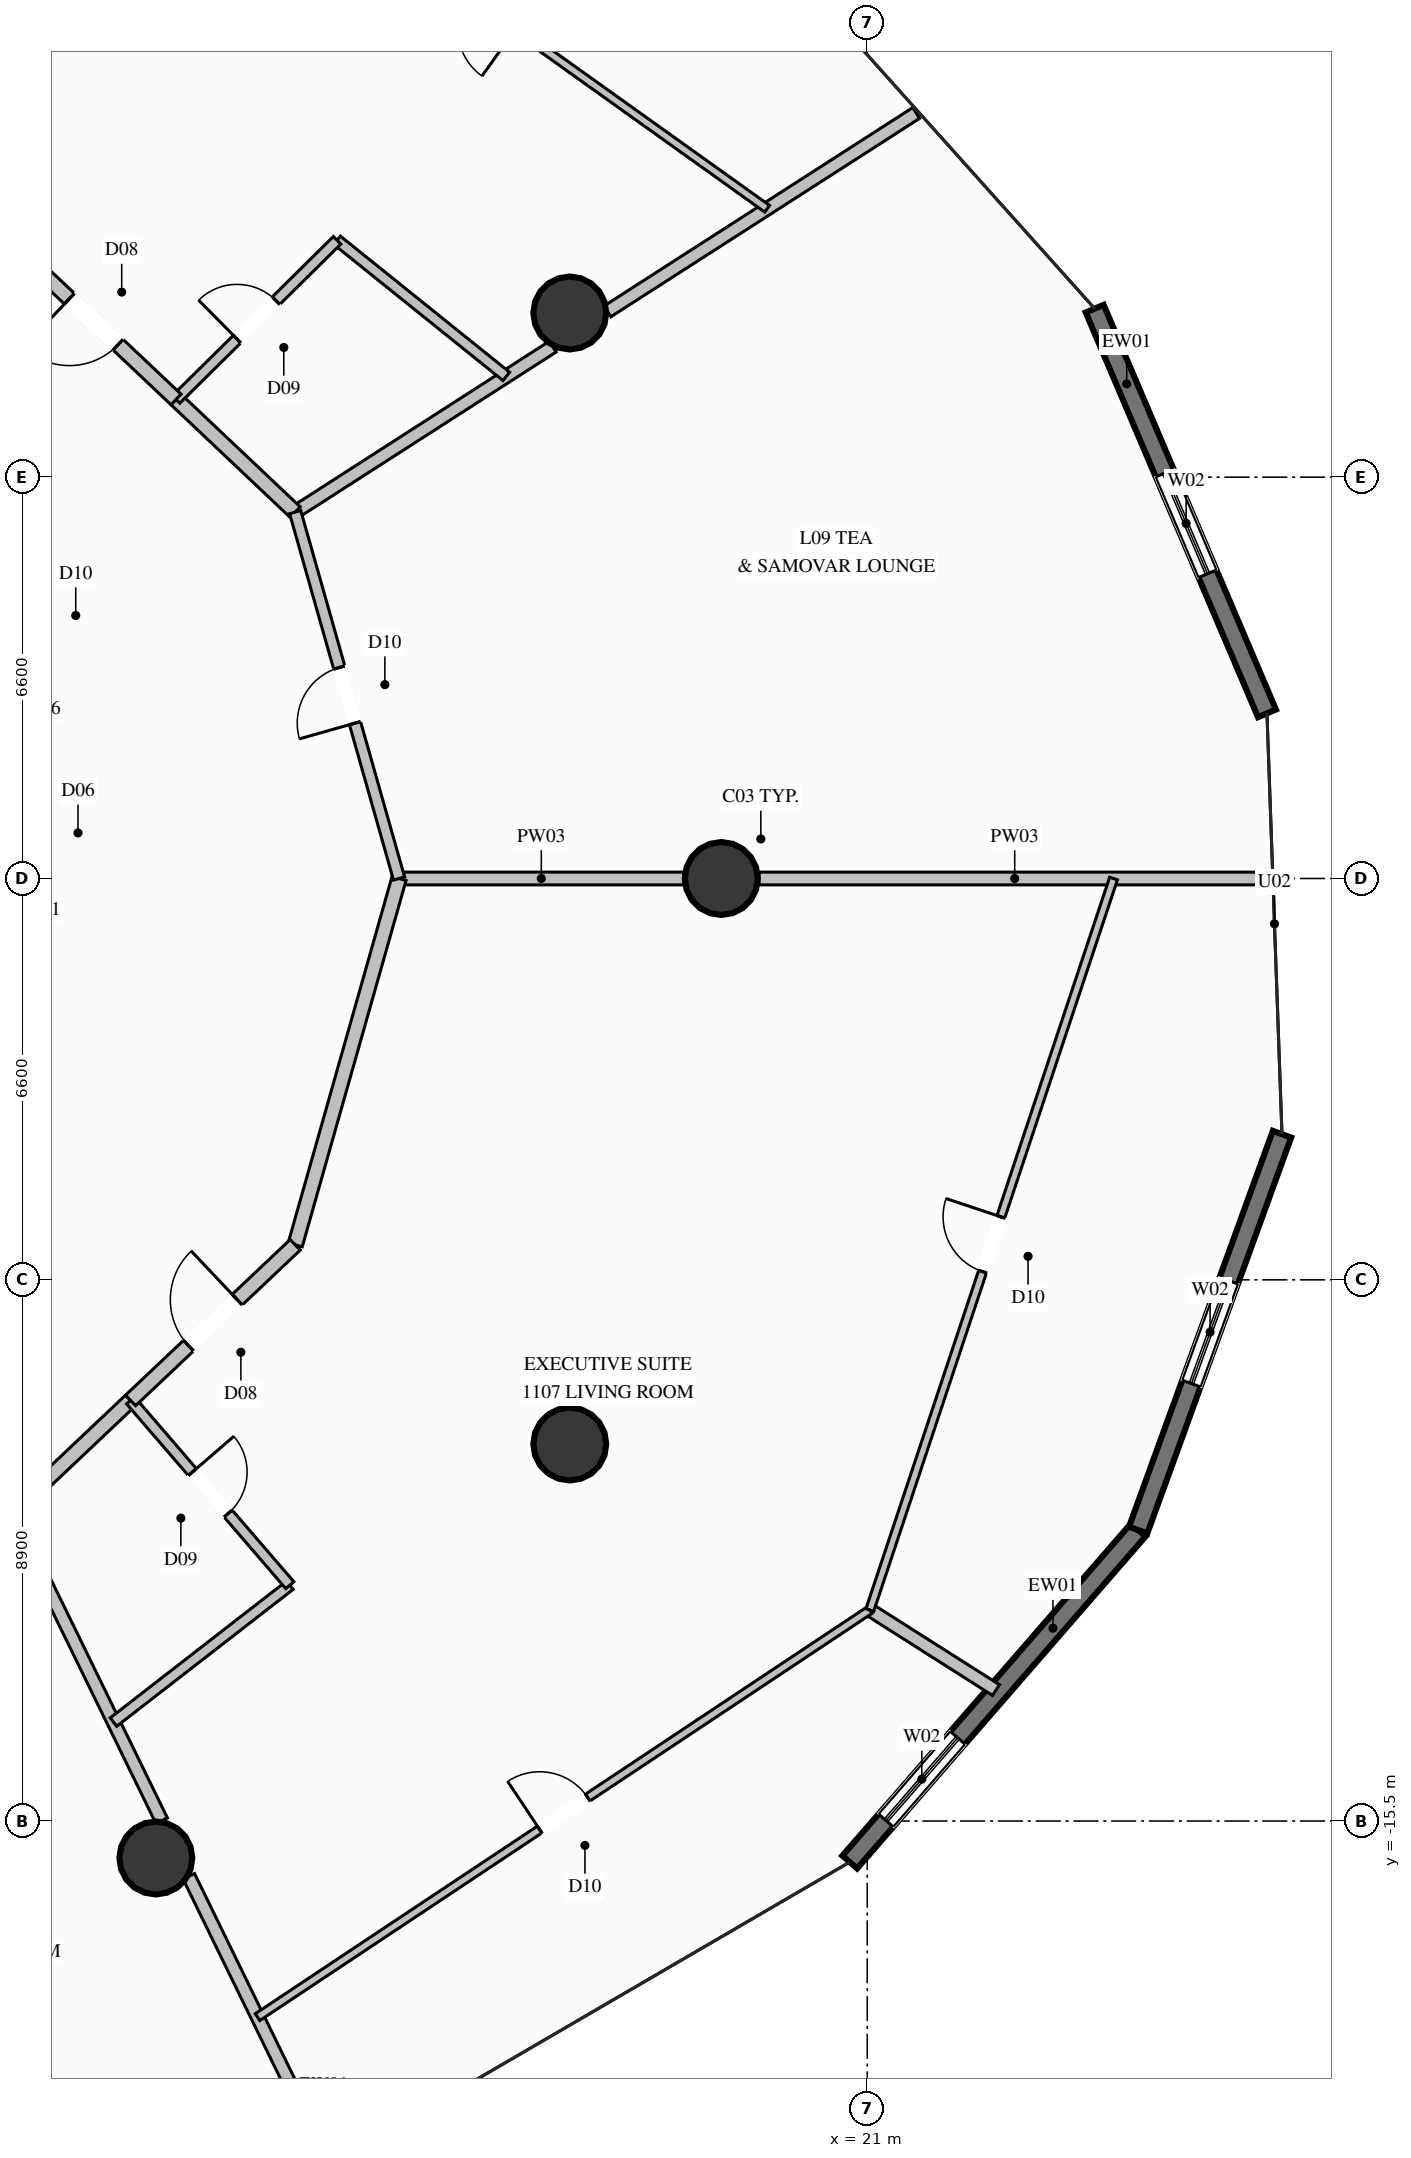
"""IFC4 building model, lengths in metres.
Left out: names, types, materials, properties, quantities, classifications, styles, units other than length and angle.
Written with IfcOpenShell. Run it as: python <this file> out.ifc"""

import sys

from ifc_helpers import new_model, si_unit, direction, frame, frame_2d, origin, origin_2d, place, context, subcontext, project, spatial, rectangle, circle, extrude, element, fill, save


model = new_model("IFC4")
c1 = context("Model", 3, precision=1e-05, world=origin(), true_north=direction((0.0, 1.0)))
c2 = subcontext(c1, "Body", "Model", "MODEL_VIEW")
j1 = project(units=[si_unit("LENGTHUNIT", "METRE"), si_unit("PLANEANGLEUNIT", "RADIAN")], contexts=[c1])
p1 = place(None, origin())
s1 = spatial("IfcSite", under=j1, at=p1, CompositionType="ELEMENT")
p2 = place(p1, origin())
s2 = spatial("IfcBuilding", under=s1, at=p2, CompositionType="ELEMENT")
p3 = place(p2, frame((0.0, 0.0, 42.8)))
s3 = spatial("IfcBuildingStorey", under=s2, at=p3, CompositionType="ELEMENT", Elevation=42.8)
for number, where, z_axis, x_axis in (
    (1, (18.6, 0.0, 0.0), (0.0, 0.0, 1.0), (1.0, 0.0, 0.0)),
    (2, (16.108, 9.3, 0.0), (0.0, 0.0, 1.0), (1.0, 0.0, 0.0)),
    (3, (9.3, -16.108, 0.0), (0.0, 0.0, 1.0), (1.0, 0.0, 0.0)),
    (4, (16.108, -9.3, 0.0), (0.0, 0.0, 1.0), (1.0, 0.0, 0.0)),
):
    element("IfcColumn", number, at=place(p3, frame(where, z_axis=z_axis, x_axis=x_axis)), inside=s3, PredefinedType="COLUMN", context=c2, shape_type="SweptSolid", body=[
        extrude(circle(Radius=0.6, at=origin_2d()), origin(), (0.0, 0.0, 1.0), 3.6),
    ])
p4 = place(p3, frame((24.741, 9.371, 0.0), z_axis=(0.0, 0.0, 1.0), x_axis=(0.391681637704, -0.920100806806, 0.0)))
e5 = element("IfcWall", 5, at=p4, inside=s3, PredefinedType="SOLIDWALL", context=c2, shape_type="SweptSolid", body=[
    extrude(rectangle(XDim=7.233, YDim=0.32, at=frame_2d((3.616, 0.0))), origin(), (0.0, 0.0, 1.0), 3.34),
])
p5 = place(p4, frame((2.938, 0.0, 0.35)))
e6 = element("IfcOpeningElement", 6, at=p5, cuts=e5, PredefinedType="OPENING", context=c2, shape_type="SweptSolid", body=[
    extrude(rectangle(XDim=1.8, YDim=2.6, at=frame_2d((0.9, 1.3))), frame((0.0, 0.17, 0.0), z_axis=(0.0, -1.0, 0.0), x_axis=(1.0, 0.0, 0.0)), (0.0, 0.0, 1.0), 0.34),
])
p6 = place(p3, frame((25.456, -10.715, 0.0), z_axis=(0.0, 0.0, 1.0), x_axis=(-0.655814261076, -0.754922284059, 0.0)))
e7 = element("IfcWall", 7, at=p6, inside=s3, PredefinedType="SOLIDWALL", context=c2, shape_type="SweptSolid", body=[
    extrude(rectangle(XDim=7.232, YDim=0.32, at=frame_2d((3.616, 0.0))), origin(), (0.0, 0.0, 1.0), 3.34),
])
p7 = place(p6, frame((4.526, 0.0, 0.35)))
e8 = element("IfcOpeningElement", 8, at=p7, cuts=e7, PredefinedType="OPENING", context=c2, shape_type="SweptSolid", body=[
    extrude(rectangle(XDim=1.8, YDim=2.6, at=frame_2d((0.9, 1.3))), frame((0.0, 0.17, 0.0), z_axis=(0.0, -1.0, 0.0), x_axis=(1.0, 0.0, 0.0)), (0.0, 0.0, 1.0), 0.34),
])
p8 = place(p3, frame((27.821, -4.205, 0.0), z_axis=(0.0, 0.0, 1.0), x_axis=(-0.341451539559, -0.939899380856, 0.0)))
e9 = element("IfcWall", 9, at=p8, inside=s3, PredefinedType="SOLIDWALL", context=c2, shape_type="SweptSolid", body=[
    extrude(rectangle(XDim=6.926, YDim=0.32, at=frame_2d((3.463, 0.0))), origin(), (0.0, 0.0, 1.0), 3.34),
])
p9 = place(p8, frame((2.563, 0.0, 0.35)))
e10 = element("IfcOpeningElement", 10, at=p9, cuts=e9, PredefinedType="OPENING", context=c2, shape_type="SweptSolid", body=[
    extrude(rectangle(XDim=1.8, YDim=2.6, at=frame_2d((0.9, 1.3))), frame((0.0, 0.17, 0.0), z_axis=(0.0, -1.0, 0.0), x_axis=(1.0, 0.0, 0.0)), (0.0, 0.0, 1.0), 0.34),
])
p10 = place(p3, frame((13.3, 0.0, 0.0), z_axis=(0.0, 0.0, 1.0), x_axis=(1.0, 0.0, 0.0)))
e11 = element("IfcWall", 11, at=p10, inside=s3, PredefinedType="PARTITIONING", context=c2, shape_type="SweptSolid", body=[
    extrude(rectangle(XDim=4.68, YDim=0.21, at=frame_2d((2.34, 0.0))), origin(), (0.0, 0.0, 1.0), 2.708),
])
p11 = place(p3, frame((19.22, 0.0, 0.0), z_axis=(0.0, 0.0, 1.0), x_axis=(1.0, 0.0, 0.0)))
e12 = element("IfcWall", 12, at=p11, inside=s3, PredefinedType="PARTITIONING", context=c2, shape_type="SweptSolid", body=[
    extrude(rectangle(XDim=8.411, YDim=0.21, at=frame_2d((4.206, 0.0))), origin(), (0.0, 0.0, 1.0), 3.34),
])
p12 = place(p3, frame((11.592, 6.025, 0.0), z_axis=(0.0, 0.0, 1.0), x_axis=(0.841200533938, 0.540723276456, 0.0)))
e13 = element("IfcWall", 13, at=p12, inside=s3, PredefinedType="PARTITIONING", context=c2, shape_type="SweptSolid", body=[
    extrude(rectangle(XDim=5.034, YDim=0.21, at=frame_2d((2.517, 0.0))), origin(), (0.0, 0.0, 1.0), 2.708),
])
p13 = place(p3, frame((16.727, 9.326, 0.0), z_axis=(0.0, 0.0, 1.0), x_axis=(0.84126651409, 0.54062061769, 0.0)))
e14 = element("IfcWall", 14, at=p13, inside=s3, PredefinedType="PARTITIONING", context=c2, shape_type="SweptSolid", body=[
    extrude(rectangle(XDim=6.036, YDim=0.21, at=frame_2d((3.018, 0.0))), origin(), (0.0, 0.0, 1.0), 3.34),
])
p14 = place(p3, frame((6.925, -10.436, 0.0), z_axis=(0.0, 0.0, 1.0), x_axis=(0.438868681405, -0.898551211942, 0.0)))
e15 = element("IfcWall", 15, at=p14, inside=s3, PredefinedType="PARTITIONING", context=c2, shape_type="SweptSolid", body=[
    extrude(rectangle(XDim=5.63, YDim=0.21, at=frame_2d((2.815, 0.0))), origin(), (0.0, 0.0, 1.0), 2.708),
])
p15 = place(p3, frame((9.842, -16.409, 0.0), z_axis=(0.0, 0.0, 1.0), x_axis=(0.438768549371, -0.89860011133, 0.0)))
e16 = element("IfcWall", 16, at=p15, inside=s3, PredefinedType="PARTITIONING", context=c2, shape_type="SweptSolid", body=[
    extrude(rectangle(XDim=4.602, YDim=0.21, at=frame_2d((2.301, 0.0))), origin(), (0.0, 0.0, 1.0), 3.34),
])
p16 = place(p3, frame((11.592, 6.025, 0.0), z_axis=(0.0, 0.0, 1.0), x_axis=(-0.726651583854, 0.687006168591, 0.0)))
e17 = element("IfcWall", 17, at=p16, inside=s3, PredefinedType="PARTITIONING", context=c2, shape_type="SweptSolid", body=[
    extrude(rectangle(XDim=2.697, YDim=0.24, at=frame_2d((1.349, 0.0))), origin(), (0.0, 0.0, 1.0), 3.34),
])
p17 = place(p3, frame((15.064, 8.257, 0.0), z_axis=(0.0, 0.0, 1.0), x_axis=(-0.779272237284, 0.626685551292, 0.0)))
e18 = element("IfcWall", 18, at=p17, inside=s3, PredefinedType="PLUMBINGWALL", context=c2, shape_type="SweptSolid", body=[
    extrude(rectangle(XDim=3.571, YDim=0.175, at=frame_2d((1.786, 0.0))), origin(), (0.0, 0.0, 1.0), 3.34),
])
p18 = place(p3, frame((9.632, 7.878, 0.0), z_axis=(0.0, 0.0, 1.0), x_axis=(0.711355516102, 0.702832362453, 0.0)))
e19 = element("IfcWall", 19, at=p18, inside=s3, PredefinedType="PLUMBINGWALL", context=c2, shape_type="SweptSolid", body=[
    extrude(rectangle(XDim=3.724, YDim=0.175, at=frame_2d((1.862, 0.0))), origin(), (0.0, 0.0, 1.0), 3.34),
])
p19 = place(p18, frame((1.412, 0.0, 0.0)))
e20 = element("IfcOpeningElement", 20, at=p19, cuts=e19, PredefinedType="OPENING", context=c2, shape_type="SweptSolid", body=[
    extrude(rectangle(XDim=0.9, YDim=2.1, at=frame_2d((0.45, 1.05))), frame((0.0, 0.098, 0.0), z_axis=(0.0, -1.0, 0.0), x_axis=(1.0, 0.0, 0.0)), (0.0, 0.0, 1.0), 0.195),
])
p20 = place(p3, frame((9.632, 7.878, 0.0), z_axis=(0.0, 0.0, 1.0), x_axis=(-0.726816794063, 0.686831382413, 0.0)))
e21 = element("IfcWall", 21, at=p20, inside=s3, PredefinedType="PARTITIONING", context=c2, shape_type="SweptSolid", body=[
    extrude(rectangle(XDim=3.725, YDim=0.24, at=frame_2d((1.862, 0.0))), origin(), (0.0, 0.0, 1.0), 3.34),
])
p21 = place(p20, frame((1.312, 0.0, 0.0)))
e22 = element("IfcOpeningElement", 22, at=p21, cuts=e21, PredefinedType="OPENING", context=c2, shape_type="SweptSolid", body=[
    extrude(rectangle(XDim=1.1, YDim=2.3, at=frame_2d((0.55, 1.15))), frame((0.0, 0.13, 0.0), z_axis=(0.0, -1.0, 0.0), x_axis=(1.0, 0.0, 0.0)), (0.0, 0.0, 1.0), 0.26),
])
p22 = place(p3, frame((19.354, 11.014, 0.0), z_axis=(0.0, 0.0, 1.0), x_axis=(-0.813724569885, 0.581250655367, 0.0)))
e23 = element("IfcWall", 23, at=p22, inside=s3, PredefinedType="PARTITIONING", context=c2, shape_type="SweptSolid", body=[
    extrude(rectangle(XDim=11.119, YDim=0.135, at=frame_2d((5.56, 0.0))), origin(), (0.0, 0.0, 1.0), 3.34),
])
p23 = place(p22, frame((5.085, 0.0, 0.0)))
e24 = element("IfcOpeningElement", 24, at=p23, cuts=e23, PredefinedType="OPENING", context=c2, shape_type="SweptSolid", body=[
    extrude(rectangle(XDim=0.95, YDim=2.1, at=frame_2d((0.475, 1.05))), frame((0.0, 0.078, 0.0), z_axis=(0.0, -1.0, 0.0), x_axis=(1.0, 0.0, 0.0)), (0.0, 0.0, 1.0), 0.155),
])
p24 = place(p3, frame((6.925, -10.436, 0.0), z_axis=(0.0, 0.0, 1.0), x_axis=(0.726651583854, 0.687006168591, 0.0)))
e25 = element("IfcWall", 25, at=p24, inside=s3, PredefinedType="PARTITIONING", context=c2, shape_type="SweptSolid", body=[
    extrude(rectangle(XDim=2.697, YDim=0.24, at=frame_2d((1.349, 0.0))), origin(), (0.0, 0.0, 1.0), 3.34),
])
p25 = place(p3, frame((8.603, -13.873, 0.0), z_axis=(0.0, 0.0, 1.0), x_axis=(0.790046287632, 0.613047195082, 0.0)))
e26 = element("IfcWall", 26, at=p25, inside=s3, PredefinedType="PLUMBINGWALL", context=c2, shape_type="SweptSolid", body=[
    extrude(rectangle(XDim=3.672, YDim=0.175, at=frame_2d((1.836, 0.0))), origin(), (0.0, 0.0, 1.0), 3.34),
])
p26 = place(p3, frame((8.885, -8.583, 0.0), z_axis=(0.0, 0.0, 1.0), x_axis=(0.6527987627, -0.757531369263, 0.0)))
e27 = element("IfcWall", 27, at=p26, inside=s3, PredefinedType="PLUMBINGWALL", context=c2, shape_type="SweptSolid", body=[
    extrude(rectangle(XDim=4.012, YDim=0.175, at=frame_2d((2.006, 0.0))), origin(), (0.0, 0.0, 1.0), 3.34),
])
p27 = place(p26, frame((1.556, 0.0, 0.0)))
e28 = element("IfcOpeningElement", 28, at=p27, cuts=e27, PredefinedType="OPENING", context=c2, shape_type="SweptSolid", body=[
    extrude(rectangle(XDim=0.9, YDim=2.1, at=frame_2d((0.45, 1.05))), frame((0.0, 0.098, 0.0), z_axis=(0.0, -1.0, 0.0), x_axis=(1.0, 0.0, 0.0)), (0.0, 0.0, 1.0), 0.195),
])
p28 = place(p3, frame((21.043, -12.029, 0.0), z_axis=(0.0, 0.0, 1.0), x_axis=(0.844131479441, -0.536136219087, 0.0)))
e29 = element("IfcWall", 29, at=p28, inside=s3, PredefinedType="PARTITIONING", context=c2, shape_type="SweptSolid", body=[
    extrude(rectangle(XDim=2.458, YDim=0.21, at=frame_2d((1.229, 0.0))), origin(), (0.0, 0.0, 1.0), 3.34),
])
p29 = place(p3, frame((11.592, -6.025, 0.0), z_axis=(0.0, 0.0, 1.0), x_axis=(0.272743314702, 0.962086838225, 0.0)))
e30 = element("IfcWall", 30, at=p29, inside=s3, PredefinedType="PARTITIONING", context=c2, shape_type="SweptSolid", body=[
    extrude(rectangle(XDim=6.262, YDim=0.24, at=frame_2d((3.131, 0.0))), origin(), (0.0, 0.0, 1.0), 2.918),
])
p30 = place(p3, frame((8.885, -8.583, 0.0), z_axis=(0.0, 0.0, 1.0), x_axis=(0.726816794063, 0.686831382413, 0.0)))
e31 = element("IfcWall", 31, at=p30, inside=s3, PredefinedType="PARTITIONING", context=c2, shape_type="SweptSolid", body=[
    extrude(rectangle(XDim=3.725, YDim=0.24, at=frame_2d((1.862, 0.0))), origin(), (0.0, 0.0, 1.0), 3.34),
])
p31 = place(p30, frame((1.312, 0.0, 0.0)))
e32 = element("IfcOpeningElement", 32, at=p31, cuts=e31, PredefinedType="OPENING", context=c2, shape_type="SweptSolid", body=[
    extrude(rectangle(XDim=1.1, YDim=2.3, at=frame_2d((0.55, 1.15))), frame((0.0, 0.13, 0.0), z_axis=(0.0, -1.0, 0.0), x_axis=(1.0, 0.0, 0.0)), (0.0, 0.0, 1.0), 0.26),
])
p32 = place(p3, frame((10.973, -18.725, 0.0), z_axis=(0.0, 0.0, 1.0), x_axis=(0.832711261184, 0.553707463827, 0.0)))
e33 = element("IfcWall", 33, at=p32, inside=s3, PredefinedType="PARTITIONING", context=c2, shape_type="SweptSolid", body=[
    extrude(rectangle(XDim=12.093, YDim=0.135, at=frame_2d((6.046, 0.0))), origin(), (0.0, 0.0, 1.0), 3.34),
])
p33 = place(p32, frame((5.572, 0.0, 0.0)))
e34 = element("IfcOpeningElement", 34, at=p33, cuts=e33, PredefinedType="OPENING", context=c2, shape_type="SweptSolid", body=[
    extrude(rectangle(XDim=0.95, YDim=2.1, at=frame_2d((0.475, 1.05))), frame((0.0, 0.078, 0.0), z_axis=(0.0, -1.0, 0.0), x_axis=(1.0, 0.0, 0.0)), (0.0, 0.0, 1.0), 0.155),
])
p34 = place(p3, frame((21.043, -12.029, 0.0), z_axis=(0.0, 0.0, 1.0), x_axis=(0.316112232613, 0.948721801369, 0.0)))
e35 = element("IfcWall", 35, at=p34, inside=s3, PredefinedType="PARTITIONING", context=c2, shape_type="SweptSolid", body=[
    extrude(rectangle(XDim=12.679, YDim=0.135, at=frame_2d((6.34, 0.0))), origin(), (0.0, 0.0, 1.0), 3.34),
])
p35 = place(p34, frame((5.865, 0.0, 0.0)))
e36 = element("IfcOpeningElement", 36, at=p35, cuts=e35, PredefinedType="OPENING", context=c2, shape_type="SweptSolid", body=[
    extrude(rectangle(XDim=0.95, YDim=2.1, at=frame_2d((0.475, 1.05))), frame((0.0, 0.078, 0.0), z_axis=(0.0, -1.0, 0.0), x_axis=(1.0, 0.0, 0.0)), (0.0, 0.0, 1.0), 0.155),
])
p36 = place(p3, frame((13.3, 0.0, 0.0), z_axis=(0.0, 0.0, 1.0), x_axis=(-0.272743314702, 0.962086838225, 0.0)))
e37 = element("IfcWall", 37, at=p36, inside=s3, PredefinedType="PARTITIONING", context=c2, shape_type="SweptSolid", body=[
    extrude(rectangle(XDim=6.262, YDim=0.19, at=frame_2d((3.131, 0.0))), origin(), (0.0, 0.0, 1.0), 2.918),
])
p37 = place(p36, frame((2.656, 0.0, 0.0)))
e38 = element("IfcOpeningElement", 38, at=p37, cuts=e37, PredefinedType="OPENING", context=c2, shape_type="SweptSolid", body=[
    extrude(rectangle(XDim=0.95, YDim=2.1, at=frame_2d((0.475, 1.05))), frame((0.0, 0.105, 0.0), z_axis=(0.0, -1.0, 0.0), x_axis=(1.0, 0.0, 0.0)), (0.0, 0.0, 1.0), 0.21),
])
p38 = place(p5, origin())
e39 = element("IfcWindow", 39, at=p38, inside=s3, PartitioningType="SINGLE_PANEL", PredefinedType="WINDOW", context=c2, shape_type="SweptSolid", body=[
    extrude(rectangle(XDim=1.8, YDim=2.6, at=frame_2d((0.9, 1.3))), frame((0.0, 0.03, 0.0), z_axis=(0.0, -1.0, 0.0), x_axis=(1.0, 0.0, 0.0)), (0.0, 0.0, 1.0), 0.06),
])
fill(e6, e39)
p39 = place(p7, origin())
e40 = element("IfcWindow", 40, at=p39, inside=s3, PartitioningType="SINGLE_PANEL", PredefinedType="WINDOW", context=c2, shape_type="SweptSolid", body=[
    extrude(rectangle(XDim=1.8, YDim=2.6, at=frame_2d((0.9, 1.3))), frame((0.0, 0.03, 0.0), z_axis=(0.0, -1.0, 0.0), x_axis=(1.0, 0.0, 0.0)), (0.0, 0.0, 1.0), 0.06),
])
fill(e8, e40)
p40 = place(p9, origin())
e41 = element("IfcWindow", 41, at=p40, inside=s3, PartitioningType="SINGLE_PANEL", PredefinedType="WINDOW", context=c2, shape_type="SweptSolid", body=[
    extrude(rectangle(XDim=1.8, YDim=2.6, at=frame_2d((0.9, 1.3))), frame((0.0, 0.03, 0.0), z_axis=(0.0, -1.0, 0.0), x_axis=(1.0, 0.0, 0.0)), (0.0, 0.0, 1.0), 0.06),
])
fill(e10, e41)
p41 = place(p19, origin())
e42 = element("IfcDoor", 42, at=p41, inside=s3, OperationType="SINGLE_SWING_LEFT", PredefinedType="DOOR", context=c2, shape_type="SweptSolid", body=[
    extrude(rectangle(XDim=0.9, YDim=2.1, at=frame_2d((0.45, 1.05))), frame((0.0, 0.025, 0.0), z_axis=(0.0, -1.0, 0.0), x_axis=(1.0, 0.0, 0.0)), (0.0, 0.0, 1.0), 0.05),
])
fill(e20, e42)
p42 = place(p21, origin())
e43 = element("IfcDoor", 43, at=p42, inside=s3, OperationType="SINGLE_SWING_RIGHT", PredefinedType="DOOR", context=c2, shape_type="SweptSolid", body=[
    extrude(rectangle(XDim=1.1, YDim=2.3, at=frame_2d((0.55, 1.15))), frame((0.0, 0.025, 0.0), z_axis=(0.0, -1.0, 0.0), x_axis=(1.0, 0.0, 0.0)), (0.0, 0.0, 1.0), 0.05),
])
fill(e22, e43)
p43 = place(p27, origin())
e44 = element("IfcDoor", 44, at=p43, inside=s3, OperationType="SINGLE_SWING_LEFT", PredefinedType="DOOR", context=c2, shape_type="SweptSolid", body=[
    extrude(rectangle(XDim=0.9, YDim=2.1, at=frame_2d((0.45, 1.05))), frame((0.0, 0.025, 0.0), z_axis=(0.0, -1.0, 0.0), x_axis=(1.0, 0.0, 0.0)), (0.0, 0.0, 1.0), 0.05),
])
fill(e28, e44)
p44 = place(p31, origin())
e45 = element("IfcDoor", 45, at=p44, inside=s3, OperationType="SINGLE_SWING_RIGHT", PredefinedType="DOOR", context=c2, shape_type="SweptSolid", body=[
    extrude(rectangle(XDim=1.1, YDim=2.3, at=frame_2d((0.55, 1.15))), frame((0.0, 0.025, 0.0), z_axis=(0.0, -1.0, 0.0), x_axis=(1.0, 0.0, 0.0)), (0.0, 0.0, 1.0), 0.05),
])
fill(e32, e45)
p45 = place(p33, origin())
e46 = element("IfcDoor", 46, at=p45, inside=s3, OperationType="SINGLE_SWING_LEFT", PredefinedType="DOOR", context=c2, shape_type="SweptSolid", body=[
    extrude(rectangle(XDim=0.95, YDim=2.1, at=frame_2d((0.475, 1.05))), frame((0.0, 0.025, 0.0), z_axis=(0.0, -1.0, 0.0), x_axis=(1.0, 0.0, 0.0)), (0.0, 0.0, 1.0), 0.05),
])
fill(e34, e46)
p46 = place(p35, origin())
e47 = element("IfcDoor", 47, at=p46, inside=s3, OperationType="SINGLE_SWING_RIGHT", PredefinedType="DOOR", context=c2, shape_type="SweptSolid", body=[
    extrude(rectangle(XDim=0.95, YDim=2.1, at=frame_2d((0.475, 1.05))), frame((0.0, 0.025, 0.0), z_axis=(0.0, -1.0, 0.0), x_axis=(1.0, 0.0, 0.0)), (0.0, 0.0, 1.0), 0.05),
])
fill(e36, e47)
p47 = place(p37, origin())
e48 = element("IfcDoor", 48, at=p47, inside=s3, OperationType="SINGLE_SWING_LEFT", PredefinedType="DOOR", context=c2, shape_type="SweptSolid", body=[
    extrude(rectangle(XDim=0.95, YDim=2.1, at=frame_2d((0.475, 1.05))), frame((0.0, 0.025, 0.0), z_axis=(0.0, -1.0, 0.0), x_axis=(1.0, 0.0, 0.0)), (0.0, 0.0, 1.0), 0.05),
])
fill(e38, e48)
save(model, sys.argv[1])
